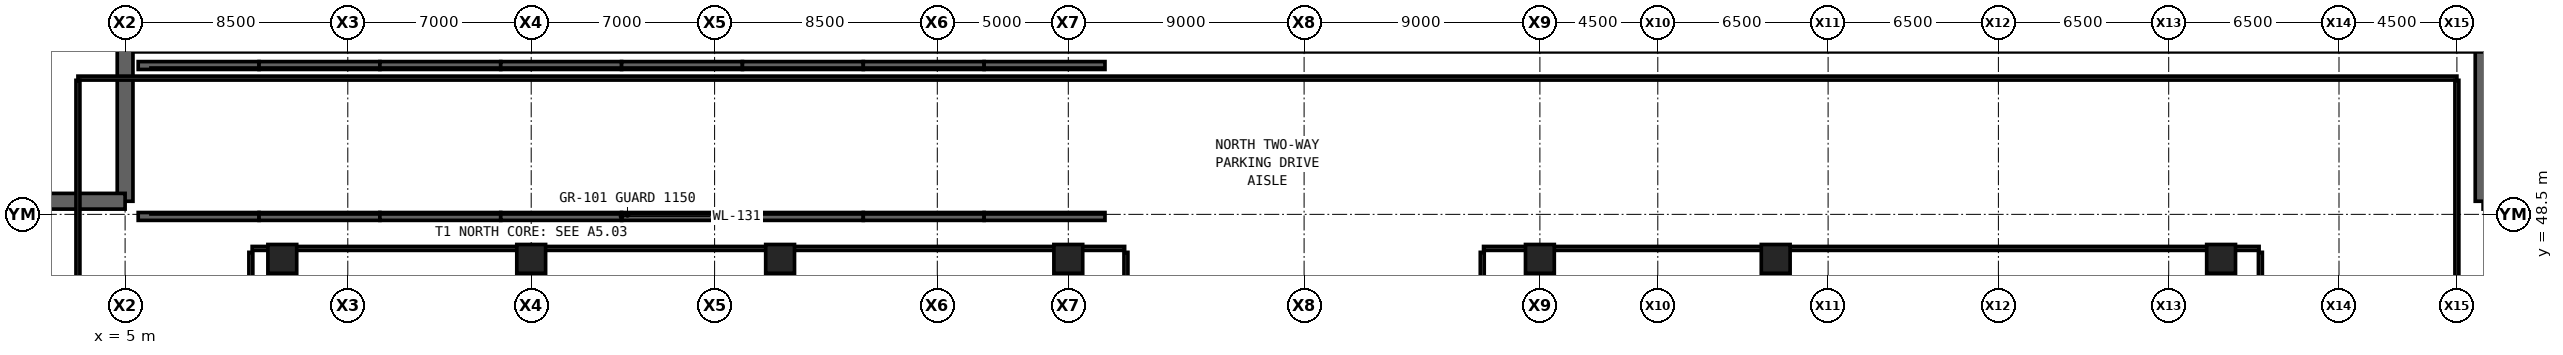
"""IFC4 building model, lengths in metres.
Left out: names, types, materials, properties, quantities, classifications, styles, units other than length and angle.
Written with IfcOpenShell. Run it as: python <this file> out.ifc"""

import sys

from ifc_helpers import new_model, si_unit, direction, frame, frame_2d, origin, origin_2d, place, context, subcontext, project, spatial, rectangle, extrude, element, save


model = new_model("IFC4")
c1 = context("Model", 3, precision=1e-05, world=origin(), true_north=direction((0.0, 1.0)))
c2 = subcontext(c1, "Body", "Model", "MODEL_VIEW")
j1 = project(units=[si_unit("LENGTHUNIT", "METRE"), si_unit("PLANEANGLEUNIT", "RADIAN")], contexts=[c1])
p1 = place(None, origin())
s1 = spatial("IfcSite", under=j1, at=p1, CompositionType="ELEMENT")
p2 = place(p1, origin())
s2 = spatial("IfcBuilding", under=s1, at=p2, CompositionType="ELEMENT")
p3 = place(p2, frame((0.0, 0.0, -4.8)))
s3 = spatial("IfcBuildingStorey", under=s2, at=p3, CompositionType="ELEMENT", Elevation=-4.8)
for number, where, z_axis, x_axis in (
    (1, (95.0, 49.0, 0.0), (0.0, 0.0, 1.0), (0.0, 1.0, 0.0)),
    (2, (5.0, 55.0, 0.0), (0.0, 0.0, 1.0), (0.0, -1.0, 0.0)),
    (3, (5.0, 49.0, 0.0), (0.0, 0.0, 1.0), (-1.0, 0.0, 0.0)),
):
    element("IfcWall", number, at=place(p3, frame(where, z_axis=z_axis, x_axis=x_axis)), inside=s3, PredefinedType="USERDEFINED", context=c2, shape_type="SweptSolid", body=[
        extrude(rectangle(XDim=6.0, YDim=0.6, at=frame_2d((3.0, 0.0))), origin(), (0.0, 0.0, 1.0), 4.62),
    ])
for number, where, z_axis, x_axis in (
    (4, (5.5, 48.42, 0.0), (0.0, 0.0, 1.0), (1.0, 0.0, 0.0)),
    (5, (5.5, 54.18, 0.0), (0.0, 0.0, 1.0), (1.0, 0.0, 0.0)),
):
    element("IfcWall", number, at=place(p3, frame(where, z_axis=z_axis, x_axis=x_axis)), inside=s3, PredefinedType="SHEAR", context=c2, shape_type="SweptSolid", body=[
        extrude(rectangle(XDim=4.613, YDim=0.3, at=frame_2d((2.306, 0.0))), origin(), (0.0, 0.0, 1.0), 3.925),
    ])
for number, where, z_axis, x_axis in (
    (6, (10.113, 48.42, 0.0), (0.0, 0.0, 1.0), (1.0, 0.0, 0.0)),
    (7, (10.113, 54.18, 0.0), (0.0, 0.0, 1.0), (1.0, 0.0, 0.0)),
):
    element("IfcWall", number, at=place(p3, frame(where, z_axis=z_axis, x_axis=x_axis)), inside=s3, PredefinedType="SHEAR", context=c2, shape_type="SweptSolid", body=[
        extrude(rectangle(XDim=4.613, YDim=0.3, at=frame_2d((2.306, 0.0))), origin(), (0.0, 0.0, 1.0), 3.325),
    ])
for number, where, z_axis, x_axis in (
    (8, (14.725, 48.42, 0.0), (0.0, 0.0, 1.0), (1.0, 0.0, 0.0)),
    (9, (14.725, 54.18, 0.0), (0.0, 0.0, 1.0), (1.0, 0.0, 0.0)),
):
    element("IfcWall", number, at=place(p3, frame(where, z_axis=z_axis, x_axis=x_axis)), inside=s3, PredefinedType="SHEAR", context=c2, shape_type="SweptSolid", body=[
        extrude(rectangle(XDim=4.612, YDim=0.3, at=frame_2d((2.306, 0.0))), origin(), (0.0, 0.0, 1.0), 2.725),
    ])
for number, where, z_axis, x_axis in (
    (10, (19.337, 48.42, 0.0), (0.0, 0.0, 1.0), (1.0, 0.0, 0.0)),
    (11, (19.337, 54.18, 0.0), (0.0, 0.0, 1.0), (1.0, 0.0, 0.0)),
):
    element("IfcWall", number, at=place(p3, frame(where, z_axis=z_axis, x_axis=x_axis)), inside=s3, PredefinedType="SHEAR", context=c2, shape_type="SweptSolid", body=[
        extrude(rectangle(XDim=4.613, YDim=0.3, at=frame_2d((2.306, 0.0))), origin(), (0.0, 0.0, 1.0), 2.125),
    ])
for number, where, z_axis, x_axis in (
    (12, (23.95, 48.42, 0.0), (0.0, 0.0, 1.0), (1.0, 0.0, 0.0)),
    (13, (23.95, 54.18, 0.0), (0.0, 0.0, 1.0), (1.0, 0.0, 0.0)),
):
    element("IfcWall", number, at=place(p3, frame(where, z_axis=z_axis, x_axis=x_axis)), inside=s3, PredefinedType="SHEAR", context=c2, shape_type="SweptSolid", body=[
        extrude(rectangle(XDim=4.613, YDim=0.3, at=frame_2d((2.306, 0.0))), origin(), (0.0, 0.0, 1.0), 1.525),
    ])
for number, where, z_axis, x_axis in (
    (14, (28.562, 48.42, 0.0), (0.0, 0.0, 1.0), (1.0, 0.0, 0.0)),
    (15, (28.562, 54.18, 0.0), (0.0, 0.0, 1.0), (1.0, 0.0, 0.0)),
):
    element("IfcWall", number, at=place(p3, frame(where, z_axis=z_axis, x_axis=x_axis)), inside=s3, PredefinedType="SHEAR", context=c2, shape_type="SweptSolid", body=[
        extrude(rectangle(XDim=4.613, YDim=0.3, at=frame_2d((2.306, 0.0))), origin(), (0.0, 0.0, 1.0), 0.925),
    ])
for number, where, z_axis, x_axis in (
    (16, (33.175, 48.42, 0.0), (0.0, 0.0, 1.0), (1.0, 0.0, 0.0)),
    (17, (33.175, 54.18, 0.0), (0.0, 0.0, 1.0), (1.0, 0.0, 0.0)),
):
    element("IfcWall", number, at=place(p3, frame(where, z_axis=z_axis, x_axis=x_axis)), inside=s3, PredefinedType="SHEAR", context=c2, shape_type="SweptSolid", body=[
        extrude(rectangle(XDim=4.613, YDim=0.3, at=frame_2d((2.306, 0.0))), origin(), (0.0, 0.0, 1.0), 0.325),
    ])
for number, where, z_axis, x_axis in (
    (18, (37.788, 48.42, 0.0), (0.0, 0.0, 1.0), (1.0, 0.0, 0.0)),
    (19, (37.788, 54.18, 0.0), (0.0, 0.0, 1.0), (1.0, 0.0, 0.0)),
):
    element("IfcWall", number, at=place(p3, frame(where, z_axis=z_axis, x_axis=x_axis)), inside=s3, PredefinedType="SHEAR", context=c2, shape_type="SweptSolid", body=[
        extrude(rectangle(XDim=4.612, YDim=0.3, at=frame_2d((2.306, 0.0))), origin(), (0.0, 0.0, 1.0), 0.12),
    ])
for number, where, z_axis, x_axis in (
    (20, (11.0, 46.8, 0.0), (0.0, 0.0, 1.0), (1.0, 0.0, 0.0)),
    (21, (20.5, 46.8, 0.0), (0.0, 0.0, 1.0), (1.0, 0.0, 0.0)),
    (22, (30.0, 46.8, 0.0), (0.0, 0.0, 1.0), (1.0, 0.0, 0.0)),
    (23, (41.0, 46.8, 0.0), (0.0, 0.0, 1.0), (1.0, 0.0, 0.0)),
    (24, (59.0, 46.8, 0.0), (0.0, 0.0, 1.0), (1.0, 0.0, 0.0)),
    (25, (68.0, 46.8, 0.0), (0.0, 0.0, 1.0), (1.0, 0.0, 0.0)),
    (26, (85.0, 46.8, 0.0), (0.0, 0.0, 1.0), (1.0, 0.0, 0.0)),
):
    element("IfcColumn", number, at=place(p3, frame(where, z_axis=z_axis, x_axis=x_axis)), inside=s3, PredefinedType="COLUMN", context=c2, shape_type="SweptSolid", body=[
        extrude(rectangle(XDim=1.1, YDim=1.1, at=origin_2d()), origin(), (0.0, 0.0, 1.0), 4.8),
    ])
p4 = place(p3, frame((9.85, 47.2, 0.0), z_axis=(0.0, 0.0, 1.0), x_axis=(1.0, 0.0, 0.0)))
e27 = element("IfcWall", 27, at=p4, inside=s3, PredefinedType="PARTITIONING", context=c2, shape_type="SweptSolid", body=[
    extrude(rectangle(XDim=33.3, YDim=0.15, at=frame_2d((16.65, 0.0))), origin(), (0.0, 0.0, 1.0), 4.3),
])
p5 = place(p3, frame((56.85, 47.2, 0.0), z_axis=(0.0, 0.0, 1.0), x_axis=(1.0, 0.0, 0.0)))
e28 = element("IfcWall", 28, at=p5, inside=s3, PredefinedType="PARTITIONING", context=c2, shape_type="SweptSolid", body=[
    extrude(rectangle(XDim=29.6, YDim=0.15, at=frame_2d((14.8, 0.0))), origin(), (0.0, 0.0, 1.0), 4.3),
])
p6 = place(p3, frame((3.2, 53.7, 0.0), z_axis=(0.0, 0.0, 1.0), x_axis=(1.0, 0.0, 0.0)))
e29 = element("IfcWall", 29, at=p6, inside=s3, PredefinedType="PARTITIONING", context=c2, shape_type="SweptSolid", body=[
    extrude(rectangle(XDim=90.8, YDim=0.15, at=frame_2d((45.4, 0.0))), origin(), (0.0, 0.0, 1.0), 4.3),
])
p7 = place(p3, frame((3.2, 11.185, 0.0), z_axis=(0.0, 0.0, 1.0), x_axis=(0.0, 1.0, 0.0)))
e30 = element("IfcWall", 30, at=p7, inside=s3, PredefinedType="PARTITIONING", context=c2, shape_type="SweptSolid", body=[
    extrude(rectangle(XDim=42.43, YDim=0.15, at=frame_2d((21.215, 0.0))), origin(), (0.0, 0.0, 1.0), 3.372),
])
p8 = place(p3, frame((9.8, 37.702, 0.0), z_axis=(0.0, 0.0, 1.0), x_axis=(0.0, 1.0, 0.0)))
e31 = element("IfcWall", 31, at=p8, inside=s3, PredefinedType="PARTITIONING", context=c2, shape_type="SweptSolid", body=[
    extrude(rectangle(XDim=9.348, YDim=0.15, at=frame_2d((4.674, 0.0))), origin(), (0.0, 0.0, 1.0), 3.372),
])
p9 = place(p3, frame((43.2, 31.885, 0.0), z_axis=(0.0, 0.0, 1.0), x_axis=(0.0, 1.0, 0.0)))
e32 = element("IfcWall", 32, at=p9, inside=s3, PredefinedType="PARTITIONING", context=c2, shape_type="SweptSolid", body=[
    extrude(rectangle(XDim=15.165, YDim=0.15, at=frame_2d((7.583, 0.0))), origin(), (0.0, 0.0, 1.0), 3.252),
])
p10 = place(p3, frame((56.8, 35.435, 0.0), z_axis=(0.0, 0.0, 1.0), x_axis=(0.0, 1.0, 0.0)))
e33 = element("IfcWall", 33, at=p10, inside=s3, PredefinedType="PARTITIONING", context=c2, shape_type="SweptSolid", body=[
    extrude(rectangle(XDim=11.615, YDim=0.15, at=frame_2d((5.808, 0.0))), origin(), (0.0, 0.0, 1.0), 3.252),
])
p11 = place(p3, frame((86.5, 30.385, 0.0), z_axis=(0.0, 0.0, 1.0), x_axis=(0.0, 1.0, 0.0)))
e34 = element("IfcWall", 34, at=p11, inside=s3, PredefinedType="PARTITIONING", context=c2, shape_type="SweptSolid", body=[
    extrude(rectangle(XDim=16.665, YDim=0.15, at=frame_2d((8.333, 0.0))), origin(), (0.0, 0.0, 1.0), 3.372),
])
p12 = place(p3, frame((94.0, 11.185, 0.0), z_axis=(0.0, 0.0, 1.0), x_axis=(0.0, 1.0, 0.0)))
e35 = element("IfcWall", 35, at=p12, inside=s3, PredefinedType="PARTITIONING", context=c2, shape_type="SweptSolid", body=[
    extrude(rectangle(XDim=42.43, YDim=0.15, at=frame_2d((21.215, 0.0))), origin(), (0.0, 0.0, 1.0), 3.436),
])
p13 = place(p12, frame((10.015, 0.0, 0.0)))
e36 = element("IfcOpeningElement", 36, at=p13, cuts=e35, PredefinedType="OPENING", context=c2, shape_type="SweptSolid", body=[
    extrude(rectangle(XDim=1.6, YDim=2.3, at=frame_2d((0.8, 1.15))), frame((0.0, 0.085, 0.0), z_axis=(0.0, -1.0, 0.0), x_axis=(1.0, 0.0, 0.0)), (0.0, 0.0, 1.0), 0.17),
])
p14 = place(p12, frame((24.415, 0.0, 0.0)))
e37 = element("IfcOpeningElement", 37, at=p14, cuts=e35, PredefinedType="OPENING", context=c2, shape_type="SweptSolid", body=[
    extrude(rectangle(XDim=1.2, YDim=2.25, at=frame_2d((0.6, 1.125))), frame((0.0, 0.085, 0.0), z_axis=(0.0, -1.0, 0.0), x_axis=(1.0, 0.0, 0.0)), (0.0, 0.0, 1.0), 0.17),
])
save(model, sys.argv[1])
